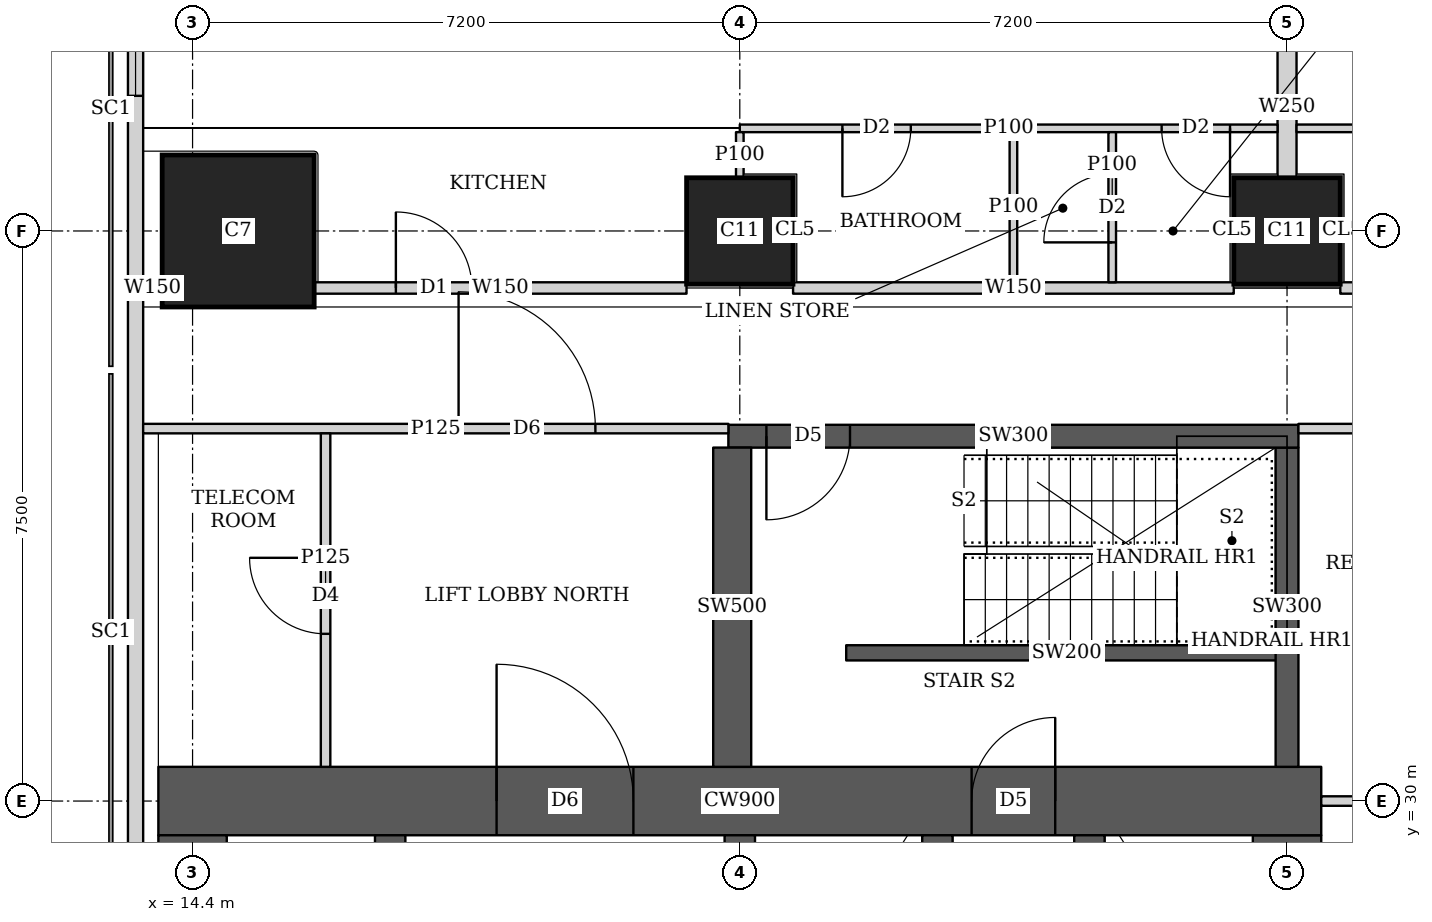
"""IFC4 building model, lengths in metres.
Left out: names, types, materials, properties, quantities, classifications, styles, units other than length and angle.
Written with IfcOpenShell. Run it as: python <this file> out.ifc"""

import sys

from ifc_helpers import new_model, si_unit, direction, frame, frame_2d, origin, origin_2d, place, context, subcontext, project, spatial, rectangle, extrude, element, fill, save


model = new_model("IFC4")
c1 = context("Model", 3, precision=1e-05, world=origin(), true_north=direction((0.0, 1.0)))
c2 = subcontext(c1, "Body", "Model", "MODEL_VIEW")
j1 = project(units=[si_unit("LENGTHUNIT", "METRE"), si_unit("PLANEANGLEUNIT", "RADIAN")], contexts=[c1])
p1 = place(None, origin())
s1 = spatial("IfcSite", under=j1, at=p1, CompositionType="ELEMENT")
p2 = place(p1, origin())
s2 = spatial("IfcBuilding", under=s1, at=p2, CompositionType="ELEMENT")
p3 = place(p2, frame((0.0, 0.0, 277.85)))
s3 = spatial("IfcBuildingStorey", under=s2, at=p3, CompositionType="ELEMENT", Elevation=277.85)
p4 = place(p3, frame((15.0, 37.5, 0.0), z_axis=(0.0, 0.0, 1.0), x_axis=(1.0, 0.0, 0.0)))
e1 = element("IfcColumn", 1, at=p4, inside=s3, PredefinedType="COLUMN", context=c2, shape_type="SweptSolid", body=[
    extrude(rectangle(XDim=2.0, YDim=2.0, at=origin_2d()), origin(), (0.0, 0.0, 1.0), 3.75),
])
for number, where, z_axis, x_axis in (
    (2, (21.6, 37.5, 0.0), (0.0, 0.0, 1.0), (1.0, 0.0, 0.0)),
    (3, (28.8, 37.5, 0.0), (0.0, 0.0, 1.0), (1.0, 0.0, 0.0)),
):
    element("IfcColumn", number, at=place(p3, frame(where, z_axis=z_axis, x_axis=x_axis)), inside=s3, PredefinedType="COLUMN", context=c2, shape_type="SweptSolid", body=[
        extrude(rectangle(XDim=1.4, YDim=1.4, at=origin_2d()), origin(), (0.0, 0.0, 1.0), 3.75),
    ])
p5 = place(p3, frame((13.95, 30.0, 0.0), z_axis=(0.0, 0.0, 1.0), x_axis=(1.0, 0.0, 0.0)))
e4 = element("IfcWall", 4, at=p5, inside=s3, PredefinedType="SHEAR", context=c2, shape_type="SweptSolid", body=[
    extrude(rectangle(XDim=15.3, YDim=0.9, at=frame_2d((7.65, 0.0))), origin(), (0.0, 0.0, 1.0), 3.75),
])
p6 = place(p5, frame((4.45, 0.0, 0.0)))
e5 = element("IfcOpeningElement", 5, at=p6, cuts=e4, PredefinedType="OPENING", context=c2, shape_type="SweptSolid", body=[
    extrude(rectangle(XDim=1.8, YDim=2.1, at=frame_2d((0.9, 1.05))), frame((0.0, 0.46, 0.0), z_axis=(0.0, -1.0, 0.0), x_axis=(1.0, 0.0, 0.0)), (0.0, 0.0, 1.0), 0.92),
])
p7 = place(p5, frame((10.7, 0.0, 0.0)))
e6 = element("IfcOpeningElement", 6, at=p7, cuts=e4, PredefinedType="OPENING", context=c2, shape_type="SweptSolid", body=[
    extrude(rectangle(XDim=1.1, YDim=2.1, at=frame_2d((0.55, 1.05))), frame((0.0, 0.46, 0.0), z_axis=(0.0, -1.0, 0.0), x_axis=(1.0, 0.0, 0.0)), (0.0, 0.0, 1.0), 0.92),
])
for number, where, z_axis, x_axis in (
    (7, (14.4, 15.45, 0.0), (0.0, 0.0, 1.0), (0.0, 1.0, 0.0)),
    (8, (28.8, 15.45, 0.0), (0.0, 0.0, 1.0), (0.0, 1.0, 0.0)),
):
    element("IfcWall", number, at=place(p3, frame(where, z_axis=z_axis, x_axis=x_axis)), inside=s3, PredefinedType="SHEAR", context=c2, shape_type="SweptSolid", body=[
        extrude(rectangle(XDim=14.1, YDim=0.9, at=frame_2d((7.05, 0.0))), origin(), (0.0, 0.0, 1.0), 3.75),
    ])
p8 = place(p3, frame((17.0, 15.45, 0.0), z_axis=(0.0, 0.0, 1.0), x_axis=(0.0, 1.0, 0.0)))
e9 = element("IfcWall", 9, at=p8, inside=s3, PredefinedType="SHEAR", context=c2, shape_type="SweptSolid", body=[
    extrude(rectangle(XDim=14.1, YDim=0.4, at=frame_2d((7.05, 0.0))), origin(), (0.0, 0.0, 1.0), 3.75),
])
p9 = place(p8, frame((1.05, 0.0, 0.0)))
e10 = element("IfcOpeningElement", 10, at=p9, cuts=e9, PredefinedType="OPENING", context=c2, shape_type="SweptSolid", body=[
    extrude(rectangle(XDim=1.0, YDim=2.1, at=frame_2d((0.5, 1.05))), frame((0.0, 0.21, 0.0), z_axis=(0.0, -1.0, 0.0), x_axis=(1.0, 0.0, 0.0)), (0.0, 0.0, 1.0), 0.42),
])
p10 = place(p8, frame((4.675, 0.0, 0.0)))
e11 = element("IfcOpeningElement", 11, at=p10, cuts=e9, PredefinedType="OPENING", context=c2, shape_type="SweptSolid", body=[
    extrude(rectangle(XDim=1.0, YDim=2.1, at=frame_2d((0.5, 1.05))), frame((0.0, 0.21, 0.0), z_axis=(0.0, -1.0, 0.0), x_axis=(1.0, 0.0, 0.0)), (0.0, 0.0, 1.0), 0.42),
])
p11 = place(p8, frame((8.425, 0.0, 0.0)))
e12 = element("IfcOpeningElement", 12, at=p11, cuts=e9, PredefinedType="OPENING", context=c2, shape_type="SweptSolid", body=[
    extrude(rectangle(XDim=1.0, YDim=2.1, at=frame_2d((0.5, 1.05))), frame((0.0, 0.21, 0.0), z_axis=(0.0, -1.0, 0.0), x_axis=(1.0, 0.0, 0.0)), (0.0, 0.0, 1.0), 0.42),
])
p12 = place(p8, frame((12.175, 0.0, 0.0)))
e13 = element("IfcOpeningElement", 13, at=p12, cuts=e9, PredefinedType="OPENING", context=c2, shape_type="SweptSolid", body=[
    extrude(rectangle(XDim=1.0, YDim=2.1, at=frame_2d((0.5, 1.05))), frame((0.0, 0.21, 0.0), z_axis=(0.0, -1.0, 0.0), x_axis=(1.0, 0.0, 0.0)), (0.0, 0.0, 1.0), 0.42),
])
p13 = place(p3, frame((21.6, 15.45, 0.0), z_axis=(0.0, 0.0, 1.0), x_axis=(0.0, 1.0, 0.0)))
e14 = element("IfcWall", 14, at=p13, inside=s3, PredefinedType="SHEAR", context=c2, shape_type="SweptSolid", body=[
    extrude(rectangle(XDim=14.1, YDim=0.4, at=frame_2d((7.05, 0.0))), origin(), (0.0, 0.0, 1.0), 3.75),
])
p14 = place(p13, frame((0.875, 0.0, 0.0)))
e15 = element("IfcOpeningElement", 15, at=p14, cuts=e14, PredefinedType="OPENING", context=c2, shape_type="SweptSolid", body=[
    extrude(rectangle(XDim=1.1, YDim=2.1, at=frame_2d((0.55, 1.05))), frame((0.0, 0.21, 0.0), z_axis=(0.0, -1.0, 0.0), x_axis=(1.0, 0.0, 0.0)), (0.0, 0.0, 1.0), 0.42),
])
p15 = place(p13, frame((4.625, 0.0, 0.0)))
e16 = element("IfcOpeningElement", 16, at=p15, cuts=e14, PredefinedType="OPENING", context=c2, shape_type="SweptSolid", body=[
    extrude(rectangle(XDim=1.1, YDim=2.1, at=frame_2d((0.55, 1.05))), frame((0.0, 0.21, 0.0), z_axis=(0.0, -1.0, 0.0), x_axis=(1.0, 0.0, 0.0)), (0.0, 0.0, 1.0), 0.42),
])
p16 = place(p13, frame((8.375, 0.0, 0.0)))
e17 = element("IfcOpeningElement", 17, at=p16, cuts=e14, PredefinedType="OPENING", context=c2, shape_type="SweptSolid", body=[
    extrude(rectangle(XDim=1.1, YDim=2.1, at=frame_2d((0.55, 1.05))), frame((0.0, 0.21, 0.0), z_axis=(0.0, -1.0, 0.0), x_axis=(1.0, 0.0, 0.0)), (0.0, 0.0, 1.0), 0.42),
])
p17 = place(p13, frame((12.125, 0.0, 0.0)))
e18 = element("IfcOpeningElement", 18, at=p17, cuts=e14, PredefinedType="OPENING", context=c2, shape_type="SweptSolid", body=[
    extrude(rectangle(XDim=1.1, YDim=2.1, at=frame_2d((0.55, 1.05))), frame((0.0, 0.21, 0.0), z_axis=(0.0, -1.0, 0.0), x_axis=(1.0, 0.0, 0.0)), (0.0, 0.0, 1.0), 0.42),
])
p18 = place(p3, frame((24.2, 15.45, 0.0), z_axis=(0.0, 0.0, 1.0), x_axis=(0.0, 1.0, 0.0)))
e19 = element("IfcWall", 19, at=p18, inside=s3, PredefinedType="SHEAR", context=c2, shape_type="SweptSolid", body=[
    extrude(rectangle(XDim=14.1, YDim=0.4, at=frame_2d((7.05, 0.0))), origin(), (0.0, 0.0, 1.0), 3.75),
])
p19 = place(p3, frame((26.2, 26.45, 0.0), z_axis=(0.0, 0.0, 1.0), x_axis=(0.0, 1.0, 0.0)))
e20 = element("IfcWall", 20, at=p19, inside=s3, PredefinedType="SHEAR", context=c2, shape_type="SweptSolid", body=[
    extrude(rectangle(XDim=3.1, YDim=0.4, at=frame_2d((1.55, 0.0))), origin(), (0.0, 0.0, 1.0), 3.75),
])
p20 = place(p19, frame((1.075, 0.0, 0.0)))
e21 = element("IfcOpeningElement", 21, at=p20, cuts=e20, PredefinedType="OPENING", context=c2, shape_type="SweptSolid", body=[
    extrude(rectangle(XDim=1.2, YDim=2.1, at=frame_2d((0.6, 1.05))), frame((0.0, 0.21, 0.0), z_axis=(0.0, -1.0, 0.0), x_axis=(1.0, 0.0, 0.0)), (0.0, 0.0, 1.0), 0.42),
])
p21 = place(p3, frame((21.45, 34.8, 0.0), z_axis=(0.0, 0.0, 1.0), x_axis=(1.0, 0.0, 0.0)))
e22 = element("IfcWall", 22, at=p21, inside=s3, PredefinedType="SHEAR", context=c2, shape_type="SweptSolid", body=[
    extrude(rectangle(XDim=7.5, YDim=0.3, at=frame_2d((3.75, 0.0))), origin(), (0.0, 0.0, 1.0), 3.75),
])
p22 = place(p21, frame((0.5, 0.0, 0.0)))
e23 = element("IfcOpeningElement", 23, at=p22, cuts=e22, PredefinedType="OPENING", context=c2, shape_type="SweptSolid", body=[
    extrude(rectangle(XDim=1.1, YDim=2.1, at=frame_2d((0.55, 1.05))), frame((0.0, 0.16, 0.0), z_axis=(0.0, -1.0, 0.0), x_axis=(1.0, 0.0, 0.0)), (0.0, 0.0, 1.0), 0.32),
])
p23 = place(p3, frame((21.5, 30.45, 0.0), z_axis=(0.0, 0.0, 1.0), x_axis=(0.0, 1.0, 0.0)))
e24 = element("IfcWall", 24, at=p23, inside=s3, PredefinedType="SHEAR", context=c2, shape_type="SweptSolid", body=[
    extrude(rectangle(XDim=4.2, YDim=0.5, at=frame_2d((2.1, 0.0))), origin(), (0.0, 0.0, 1.0), 3.75),
])
p24 = place(p3, frame((28.8, 30.45, 0.0), z_axis=(0.0, 0.0, 1.0), x_axis=(0.0, 1.0, 0.0)))
e25 = element("IfcWall", 25, at=p24, inside=s3, PredefinedType="SHEAR", context=c2, shape_type="SweptSolid", body=[
    extrude(rectangle(XDim=4.2, YDim=0.3, at=frame_2d((2.1, 0.0))), origin(), (0.0, 0.0, 1.0), 3.75),
])
p25 = place(p3, frame((13.65, 43.037, 0.0), z_axis=(0.0, 0.0, 1.0), x_axis=(0.0, -1.0, 0.0)))
e26 = element("IfcWall", 26, at=p25, inside=s3, PredefinedType="SOLIDWALL", context=c2, shape_type="SweptSolid", body=[
    extrude(rectangle(XDim=35.374, YDim=0.2, at=frame_2d((17.687, 0.0))), origin(), (0.0, 0.0, 1.0), 3.5),
])
p26 = place(p25, frame((1.959, 0.0, 0.9)))
e27 = element("IfcOpeningElement", 27, at=p26, cuts=e26, PredefinedType="OPENING", context=c2, shape_type="SweptSolid", body=[
    extrude(rectangle(XDim=1.8, YDim=1.5, at=frame_2d((0.9, 0.75))), frame((0.0, 0.11, 0.0), z_axis=(0.0, -1.0, 0.0), x_axis=(1.0, 0.0, 0.0)), (0.0, 0.0, 1.0), 0.22),
])
p27 = place(p3, frame((13.75, 36.75, 0.0), z_axis=(0.0, 0.0, 1.0), x_axis=(1.0, 0.0, 0.0)))
e28 = element("IfcWall", 28, at=p27, inside=s3, PredefinedType="SOLIDWALL", context=c2, shape_type="SweptSolid", body=[
    extrude(rectangle(XDim=0.249, YDim=0.15, at=frame_2d((0.125, 0.0))), origin(), (0.0, 0.0, 1.0), 3.5),
])
p28 = place(p3, frame((16.001, 36.75, 0.0), z_axis=(0.0, 0.0, 1.0), x_axis=(1.0, 0.0, 0.0)))
e29 = element("IfcWall", 29, at=p28, inside=s3, PredefinedType="SOLIDWALL", context=c2, shape_type="SweptSolid", body=[
    extrude(rectangle(XDim=4.898, YDim=0.15, at=frame_2d((2.449, 0.0))), origin(), (0.0, 0.0, 1.0), 3.5),
])
p29 = place(p28, frame((1.074, 0.0, 0.0)))
e30 = element("IfcOpeningElement", 30, at=p29, cuts=e29, PredefinedType="OPENING", context=c2, shape_type="SweptSolid", body=[
    extrude(rectangle(XDim=1.0, YDim=2.1, at=frame_2d((0.5, 1.05))), frame((0.0, 0.085, 0.0), z_axis=(0.0, -1.0, 0.0), x_axis=(1.0, 0.0, 0.0)), (0.0, 0.0, 1.0), 0.17),
])
p30 = place(p3, frame((22.301, 36.75, 0.0), z_axis=(0.0, 0.0, 1.0), x_axis=(1.0, 0.0, 0.0)))
e31 = element("IfcWall", 31, at=p30, inside=s3, PredefinedType="SOLIDWALL", context=c2, shape_type="SweptSolid", body=[
    extrude(rectangle(XDim=5.798, YDim=0.15, at=frame_2d((2.899, 0.0))), origin(), (0.0, 0.0, 1.0), 3.5),
])
p31 = place(p3, frame((29.501, 36.75, 0.0), z_axis=(0.0, 0.0, 1.0), x_axis=(1.0, 0.0, 0.0)))
e32 = element("IfcWall", 32, at=p31, inside=s3, PredefinedType="SOLIDWALL", context=c2, shape_type="SweptSolid", body=[
    extrude(rectangle(XDim=5.216, YDim=0.15, at=frame_2d((2.608, 0.0))), origin(), (0.0, 0.0, 1.0), 3.5),
])
p32 = place(p31, frame((3.305, 0.0, 0.0)))
e33 = element("IfcOpeningElement", 33, at=p32, cuts=e32, PredefinedType="OPENING", context=c2, shape_type="SweptSolid", body=[
    extrude(rectangle(XDim=1.0, YDim=2.1, at=frame_2d((0.5, 1.05))), frame((0.0, 0.085, 0.0), z_axis=(0.0, -1.0, 0.0), x_axis=(1.0, 0.0, 0.0)), (0.0, 0.0, 1.0), 0.17),
])
p33 = place(p3, frame((21.6, 38.85, 0.0), z_axis=(0.0, 0.0, 1.0), x_axis=(1.0, 0.0, 0.0)))
e34 = element("IfcWall", 34, at=p33, inside=s3, PredefinedType="PARTITIONING", context=c2, shape_type="SweptSolid", body=[
    extrude(rectangle(XDim=7.075, YDim=0.1, at=frame_2d((3.538, 0.0))), origin(), (0.0, 0.0, 1.0), 3.5),
])
p34 = place(p33, frame((1.35, 0.0, 0.0)))
e35 = element("IfcOpeningElement", 35, at=p34, cuts=e34, PredefinedType="OPENING", context=c2, shape_type="SweptSolid", body=[
    extrude(rectangle(XDim=0.9, YDim=2.1, at=frame_2d((0.45, 1.05))), frame((0.0, 0.06, 0.0), z_axis=(0.0, -1.0, 0.0), x_axis=(1.0, 0.0, 0.0)), (0.0, 0.0, 1.0), 0.12),
])
p35 = place(p33, frame((5.55, 0.0, 0.0)))
e36 = element("IfcOpeningElement", 36, at=p35, cuts=e34, PredefinedType="OPENING", context=c2, shape_type="SweptSolid", body=[
    extrude(rectangle(XDim=0.9, YDim=2.1, at=frame_2d((0.45, 1.05))), frame((0.0, 0.06, 0.0), z_axis=(0.0, -1.0, 0.0), x_axis=(1.0, 0.0, 0.0)), (0.0, 0.0, 1.0), 0.12),
])
p36 = place(p3, frame((21.6, 38.201, 0.0), z_axis=(0.0, 0.0, 1.0), x_axis=(0.0, 1.0, 0.0)))
e37 = element("IfcWall", 37, at=p36, inside=s3, PredefinedType="PARTITIONING", context=c2, shape_type="SweptSolid", body=[
    extrude(rectangle(XDim=0.599, YDim=0.1, at=frame_2d((0.3, 0.0))), origin(), (0.0, 0.0, 1.0), 3.5),
])
p37 = place(p3, frame((25.2, 36.825, 0.0), z_axis=(0.0, 0.0, 1.0), x_axis=(0.0, 1.0, 0.0)))
e38 = element("IfcWall", 38, at=p37, inside=s3, PredefinedType="PARTITIONING", context=c2, shape_type="SweptSolid", body=[
    extrude(rectangle(XDim=1.975, YDim=0.1, at=frame_2d((0.988, 0.0))), origin(), (0.0, 0.0, 1.0), 3.5),
])
p38 = place(p3, frame((26.5, 36.825, 0.0), z_axis=(0.0, 0.0, 1.0), x_axis=(0.0, 1.0, 0.0)))
e39 = element("IfcWall", 39, at=p38, inside=s3, PredefinedType="PARTITIONING", context=c2, shape_type="SweptSolid", body=[
    extrude(rectangle(XDim=1.975, YDim=0.1, at=frame_2d((0.988, 0.0))), origin(), (0.0, 0.0, 1.0), 3.5),
])
p39 = place(p38, frame((0.525, 0.0, 0.0)))
e40 = element("IfcOpeningElement", 40, at=p39, cuts=e39, PredefinedType="OPENING", context=c2, shape_type="SweptSolid", body=[
    extrude(rectangle(XDim=0.9, YDim=2.1, at=frame_2d((0.45, 1.05))), frame((0.0, 0.06, 0.0), z_axis=(0.0, -1.0, 0.0), x_axis=(1.0, 0.0, 0.0)), (0.0, 0.0, 1.0), 0.12),
])
p40 = place(p3, frame((28.925, 38.85, 0.0), z_axis=(0.0, 0.0, 1.0), x_axis=(1.0, 0.0, 0.0)))
e41 = element("IfcWall", 41, at=p40, inside=s3, PredefinedType="PARTITIONING", context=c2, shape_type="SweptSolid", body=[
    extrude(rectangle(XDim=2.879, YDim=0.1, at=frame_2d((1.439, 0.0))), origin(), (0.0, 0.0, 1.0), 3.5),
])
p41 = place(p40, frame((0.925, 0.0, 0.0)))
e42 = element("IfcOpeningElement", 42, at=p41, cuts=e41, PredefinedType="OPENING", context=c2, shape_type="SweptSolid", body=[
    extrude(rectangle(XDim=0.9, YDim=2.1, at=frame_2d((0.45, 1.05))), frame((0.0, 0.06, 0.0), z_axis=(0.0, -1.0, 0.0), x_axis=(1.0, 0.0, 0.0)), (0.0, 0.0, 1.0), 0.12),
])
p42 = place(p3, frame((28.8, 38.201, 0.0), z_axis=(0.0, 0.0, 1.0), x_axis=(0.0, 1.0, 0.0)))
e43 = element("IfcWall", 43, at=p42, inside=s3, PredefinedType="SOLIDWALL", context=c2, shape_type="SweptSolid", body=[
    extrude(rectangle(XDim=1.849, YDim=0.25, at=frame_2d((0.925, 0.0))), origin(), (0.0, 0.0, 1.0), 3.5),
])
p43 = place(p3, frame((13.75, 34.9, 0.0), z_axis=(0.0, 0.0, 1.0), x_axis=(1.0, 0.0, 0.0)))
e44 = element("IfcWall", 44, at=p43, inside=s3, PredefinedType="PARTITIONING", context=c2, shape_type="SweptSolid", body=[
    extrude(rectangle(XDim=7.7, YDim=0.125, at=frame_2d((3.85, 0.0))), origin(), (0.0, 0.0, 1.0), 3.5),
])
p44 = place(p43, frame((4.15, 0.0, 0.0)))
e45 = element("IfcOpeningElement", 45, at=p44, cuts=e44, PredefinedType="OPENING", context=c2, shape_type="SweptSolid", body=[
    extrude(rectangle(XDim=1.8, YDim=2.1, at=frame_2d((0.9, 1.05))), frame((0.0, 0.073, 0.0), z_axis=(0.0, -1.0, 0.0), x_axis=(1.0, 0.0, 0.0)), (0.0, 0.0, 1.0), 0.145),
])
p45 = place(p3, frame((16.15, 30.45, 0.0), z_axis=(0.0, 0.0, 1.0), x_axis=(0.0, 1.0, 0.0)))
e46 = element("IfcWall", 46, at=p45, inside=s3, PredefinedType="PARTITIONING", context=c2, shape_type="SweptSolid", body=[
    extrude(rectangle(XDim=4.387, YDim=0.125, at=frame_2d((2.193, 0.0))), origin(), (0.0, 0.0, 1.0), 3.5),
])
p46 = place(p45, frame((1.75, 0.0, 0.0)))
e47 = element("IfcOpeningElement", 47, at=p46, cuts=e46, PredefinedType="OPENING", context=c2, shape_type="SweptSolid", body=[
    extrude(rectangle(XDim=1.0, YDim=2.1, at=frame_2d((0.5, 1.05))), frame((0.0, 0.073, 0.0), z_axis=(0.0, -1.0, 0.0), x_axis=(1.0, 0.0, 0.0)), (0.0, 0.0, 1.0), 0.145),
])
p47 = place(p3, frame((28.95, 34.9, 0.0), z_axis=(0.0, 0.0, 1.0), x_axis=(1.0, 0.0, 0.0)))
e48 = element("IfcWall", 48, at=p47, inside=s3, PredefinedType="PARTITIONING", context=c2, shape_type="SweptSolid", body=[
    extrude(rectangle(XDim=4.334, YDim=0.125, at=frame_2d((2.167, 0.0))), origin(), (0.0, 0.0, 1.0), 3.5),
])
p48 = place(p3, frame((29.25, 30.0, 0.0), z_axis=(0.0, 0.0, 1.0), x_axis=(1.0, 0.0, 0.0)))
e49 = element("IfcWall", 49, at=p48, inside=s3, PredefinedType="PARTITIONING", context=c2, shape_type="SweptSolid", body=[
    extrude(rectangle(XDim=3.049, YDim=0.125, at=frame_2d((1.524, 0.0))), origin(), (0.0, 0.0, 1.0), 3.5),
])
p49 = place(p3, frame((23.0, 31.95, 0.0), z_axis=(0.0, 0.0, 1.0), x_axis=(1.0, 0.0, 0.0)))
e50 = element("IfcWall", 50, at=p49, inside=s3, PredefinedType="SHEAR", context=c2, shape_type="SweptSolid", body=[
    extrude(rectangle(XDim=5.8, YDim=0.2, at=frame_2d((2.9, 0.0))), origin(), (0.0, 0.0, 1.0), 3.75),
])
p50 = place(p26, origin())
e51 = element("IfcWindow", 51, at=p50, inside=s3, PartitioningType="SINGLE_PANEL", PredefinedType="WINDOW", context=c2, shape_type="SweptSolid", body=[
    extrude(rectangle(XDim=1.8, YDim=1.5, at=frame_2d((0.9, 0.75))), frame((0.0, 0.03, 0.0), z_axis=(0.0, -1.0, 0.0), x_axis=(1.0, 0.0, 0.0)), (0.0, 0.0, 1.0), 0.06),
])
fill(e27, e51)
p51 = place(p34, origin())
e52 = element("IfcDoor", 52, at=p51, inside=s3, OperationType="SINGLE_SWING_RIGHT", PredefinedType="DOOR", context=c2, shape_type="SweptSolid", body=[
    extrude(rectangle(XDim=0.9, YDim=2.1, at=frame_2d((0.45, 1.05))), frame((0.0, 0.025, 0.0), z_axis=(0.0, -1.0, 0.0), x_axis=(1.0, 0.0, 0.0)), (0.0, 0.0, 1.0), 0.05),
])
fill(e35, e52)
p52 = place(p35, origin())
e53 = element("IfcDoor", 53, at=p52, inside=s3, OperationType="SINGLE_SWING_LEFT", PredefinedType="DOOR", context=c2, shape_type="SweptSolid", body=[
    extrude(rectangle(XDim=0.9, YDim=2.1, at=frame_2d((0.45, 1.05))), frame((0.0, 0.025, 0.0), z_axis=(0.0, -1.0, 0.0), x_axis=(1.0, 0.0, 0.0)), (0.0, 0.0, 1.0), 0.05),
])
fill(e36, e53)
p53 = place(p39, origin())
e54 = element("IfcDoor", 54, at=p53, inside=s3, OperationType="SINGLE_SWING_LEFT", PredefinedType="DOOR", context=c2, shape_type="SweptSolid", body=[
    extrude(rectangle(XDim=0.9, YDim=2.1, at=frame_2d((0.45, 1.05))), frame((0.0, 0.025, 0.0), z_axis=(0.0, -1.0, 0.0), x_axis=(1.0, 0.0, 0.0)), (0.0, 0.0, 1.0), 0.05),
])
fill(e40, e54)
p54 = place(p29, origin())
e55 = element("IfcDoor", 55, at=p54, inside=s3, OperationType="SINGLE_SWING_LEFT", PredefinedType="DOOR", context=c2, shape_type="SweptSolid", body=[
    extrude(rectangle(XDim=1.0, YDim=2.1, at=frame_2d((0.5, 1.05))), frame((0.0, 0.025, 0.0), z_axis=(0.0, -1.0, 0.0), x_axis=(1.0, 0.0, 0.0)), (0.0, 0.0, 1.0), 0.05),
])
fill(e30, e55)
p55 = place(p46, origin())
e56 = element("IfcDoor", 56, at=p55, inside=s3, OperationType="SINGLE_SWING_RIGHT", PredefinedType="DOOR", context=c2, shape_type="SweptSolid", body=[
    extrude(rectangle(XDim=1.0, YDim=2.1, at=frame_2d((0.5, 1.05))), frame((0.0, 0.025, 0.0), z_axis=(0.0, -1.0, 0.0), x_axis=(1.0, 0.0, 0.0)), (0.0, 0.0, 1.0), 0.05),
])
fill(e47, e56)
p56 = place(p44, origin())
e57 = element("IfcDoor", 57, at=p56, inside=s3, OperationType="DOUBLE_DOOR_SINGLE_SWING", PredefinedType="DOOR", context=c2, shape_type="SweptSolid", body=[
    extrude(rectangle(XDim=1.8, YDim=2.1, at=frame_2d((0.9, 1.05))), frame((0.0, 0.025, 0.0), z_axis=(0.0, -1.0, 0.0), x_axis=(1.0, 0.0, 0.0)), (0.0, 0.0, 1.0), 0.05),
])
fill(e45, e57)
p57 = place(p6, origin())
e58 = element("IfcDoor", 58, at=p57, inside=s3, OperationType="DOUBLE_DOOR_SINGLE_SWING", PredefinedType="DOOR", context=c2, shape_type="SweptSolid", body=[
    extrude(rectangle(XDim=1.8, YDim=2.1, at=frame_2d((0.9, 1.05))), frame((0.0, 0.025, 0.0), z_axis=(0.0, -1.0, 0.0), x_axis=(1.0, 0.0, 0.0)), (0.0, 0.0, 1.0), 0.05),
])
fill(e5, e58)
p58 = place(p7, origin())
e59 = element("IfcDoor", 59, at=p58, inside=s3, OperationType="SINGLE_SWING_RIGHT", PredefinedType="DOOR", context=c2, shape_type="SweptSolid", body=[
    extrude(rectangle(XDim=1.1, YDim=2.1, at=frame_2d((0.55, 1.05))), frame((0.0, 0.025, 0.0), z_axis=(0.0, -1.0, 0.0), x_axis=(1.0, 0.0, 0.0)), (0.0, 0.0, 1.0), 0.05),
])
fill(e6, e59)
p59 = place(p22, origin())
e60 = element("IfcDoor", 60, at=p59, inside=s3, OperationType="SINGLE_SWING_RIGHT", PredefinedType="DOOR", context=c2, shape_type="SweptSolid", body=[
    extrude(rectangle(XDim=1.1, YDim=2.1, at=frame_2d((0.55, 1.05))), frame((0.0, 0.025, 0.0), z_axis=(0.0, -1.0, 0.0), x_axis=(1.0, 0.0, 0.0)), (0.0, 0.0, 1.0), 0.05),
])
fill(e23, e60)
save(model, sys.argv[1])
